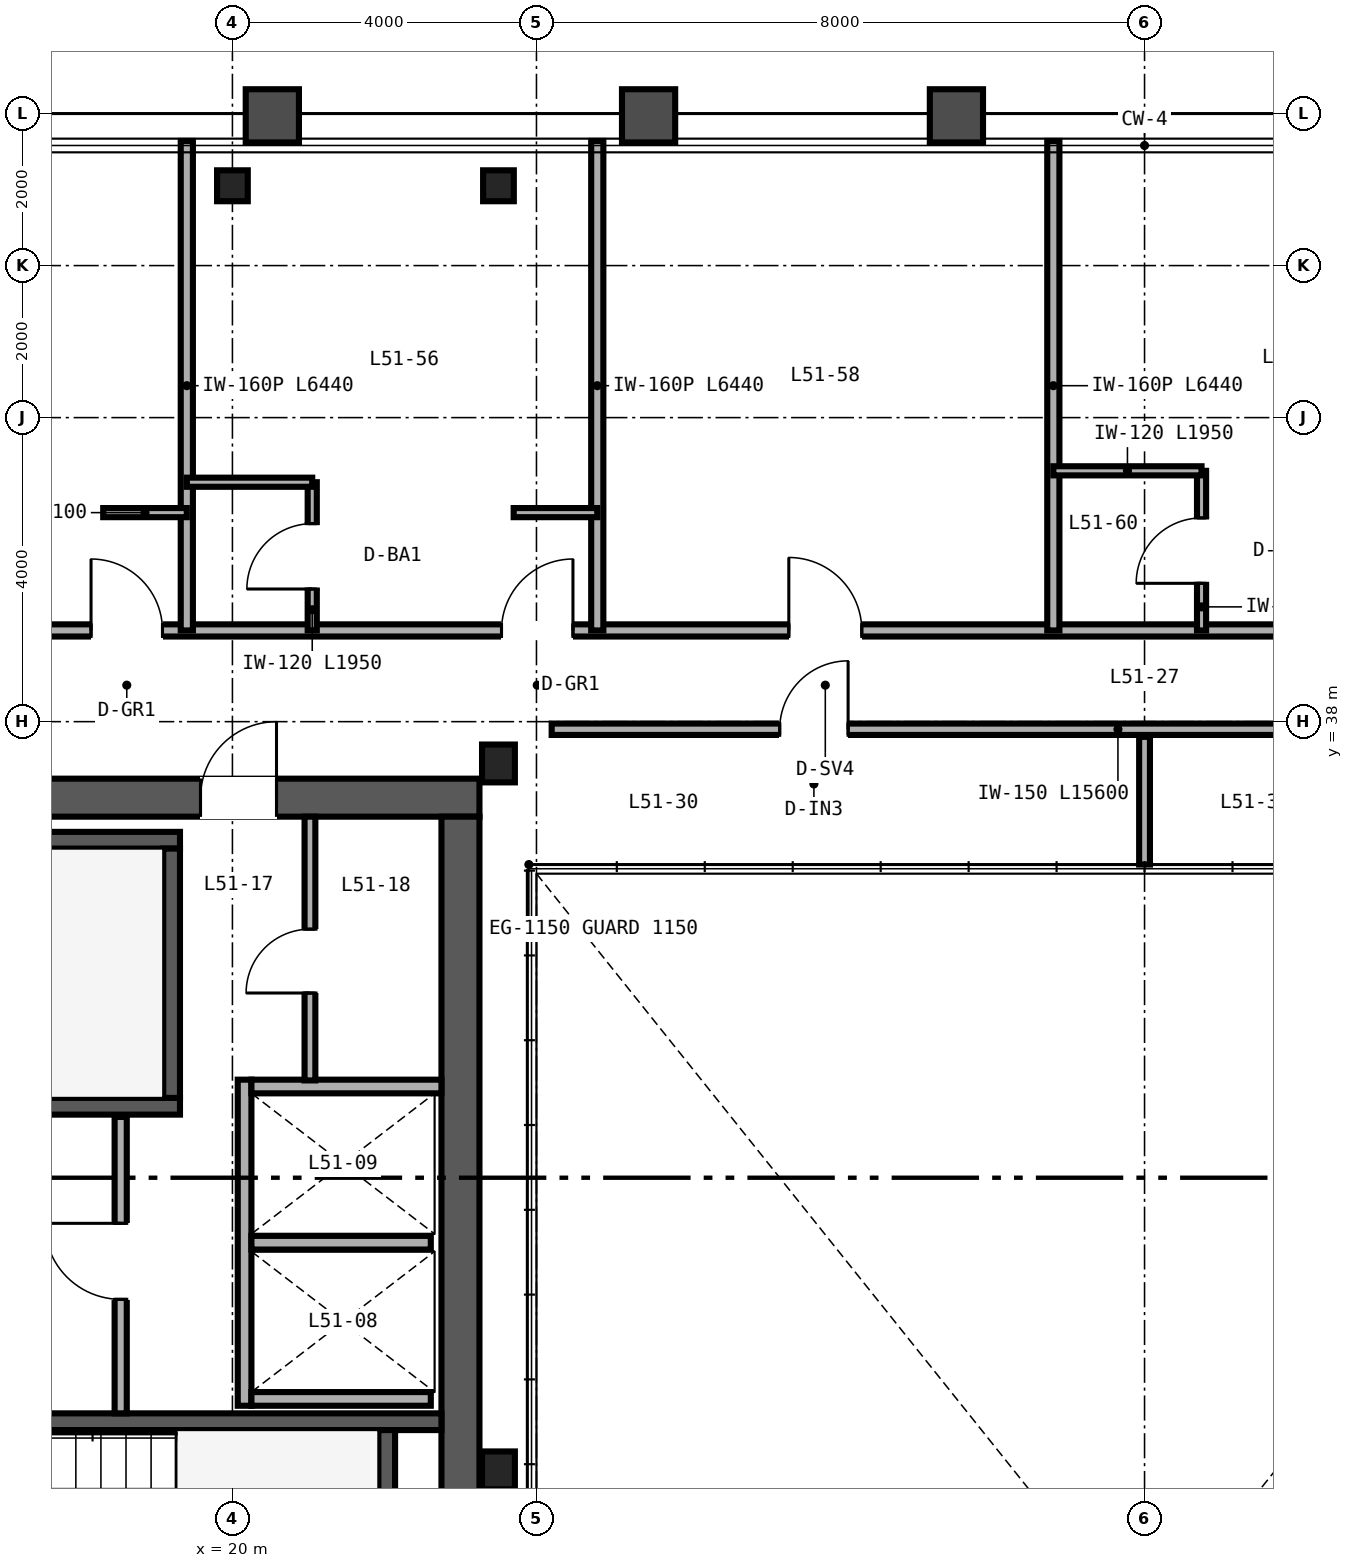
"""IFC4 building model, lengths in metres.
Left out: names, types, materials, properties, quantities, classifications, styles, units other than length and angle.
Written with IfcOpenShell. Run it as: python <this file> out.ifc"""

import sys

from ifc_helpers import new_model, si_unit, direction, frame, frame_2d, origin, origin_2d, place, context, subcontext, project, spatial, rectangle, i_section, extrude, source, transform, mapped, element, fill, save


model = new_model("IFC4")
c1 = context("Model", 3, precision=1e-05, world=origin(), true_north=direction((0.0, 1.0)))
c2 = subcontext(c1, "Body", "Model", "MODEL_VIEW")
j1 = project(units=[si_unit("LENGTHUNIT", "METRE"), si_unit("PLANEANGLEUNIT", "RADIAN")], contexts=[c1])
p1 = place(None, origin())
s1 = spatial("IfcSite", under=j1, at=p1, CompositionType="ELEMENT")
p2 = place(p1, origin())
s2 = spatial("IfcBuilding", under=s1, at=p2, CompositionType="ELEMENT")
p3 = place(p2, frame((0.0, 0.0, 202.8)))
s3 = spatial("IfcBuildingStorey", under=s2, at=p3, CompositionType="ELEMENT", Elevation=202.8)
p4 = place(p3, frame((10.75, 37.0, 0.0), z_axis=(0.0, 0.0, 1.0), x_axis=(1.0, 0.0, 0.0)))
e1 = element("IfcWall", 1, at=p4, inside=s3, PredefinedType="SHEAR", context=c2, shape_type="SweptSolid", body=[
    extrude(rectangle(XDim=12.5, YDim=0.5, at=frame_2d((6.25, 0.0))), origin(), (0.0, 0.0, 1.0), 3.37),
])
p5 = place(p4, frame((8.83, 0.0, 0.0)))
e2 = element("IfcOpeningElement", 2, at=p5, cuts=e1, PredefinedType="OPENING", context=c2, shape_type="SweptSolid", body=[
    extrude(rectangle(XDim=1.0, YDim=2.15, at=frame_2d((0.5, 1.075))), frame((0.0, 0.26, 0.0), z_axis=(0.0, -1.0, 0.0), x_axis=(1.0, 0.0, 0.0)), (0.0, 0.0, 1.0), 0.52),
])
p6 = place(p3, frame((23.0, 15.25, 0.0), z_axis=(0.0, 0.0, 1.0), x_axis=(0.0, 1.0, 0.0)))
e3 = element("IfcWall", 3, at=p6, inside=s3, PredefinedType="SHEAR", context=c2, shape_type="SweptSolid", body=[
    extrude(rectangle(XDim=21.5, YDim=0.5, at=frame_2d((10.75, 0.0))), origin(), (0.0, 0.0, 1.0), 3.37),
])
p7 = place(p3, frame((11.25, 32.94, 0.0), z_axis=(0.0, 0.0, 1.0), x_axis=(1.0, 0.0, 0.0)))
e4 = element("IfcWall", 4, at=p7, inside=s3, PredefinedType="SHEAR", context=c2, shape_type="SweptSolid", body=[
    extrude(rectangle(XDim=8.06, YDim=0.22, at=frame_2d((4.03, 0.0))), origin(), (0.0, 0.0, 1.0), 3.4),
])
p8 = place(p7, frame((0.67, 0.0, 0.0)))
e5 = element("IfcOpeningElement", 5, at=p8, cuts=e4, PredefinedType="OPENING", context=c2, shape_type="SweptSolid", body=[
    extrude(rectangle(XDim=1.05, YDim=2.15, at=frame_2d((0.525, 1.075))), frame((0.0, 0.12, 0.0), z_axis=(0.0, -1.0, 0.0), x_axis=(1.0, 0.0, 0.0)), (0.0, 0.0, 1.0), 0.24),
])
p9 = place(p3, frame((11.25, 36.44, 0.0), z_axis=(0.0, 0.0, 1.0), x_axis=(1.0, 0.0, 0.0)))
e6 = element("IfcWall", 6, at=p9, inside=s3, PredefinedType="SHEAR", context=c2, shape_type="SweptSolid", body=[
    extrude(rectangle(XDim=8.06, YDim=0.22, at=frame_2d((4.03, 0.0))), origin(), (0.0, 0.0, 1.0), 3.4),
])
p10 = place(p3, frame((19.2, 33.05, 0.0), z_axis=(0.0, 0.0, 1.0), x_axis=(0.0, 1.0, 0.0)))
e7 = element("IfcWall", 7, at=p10, inside=s3, PredefinedType="SHEAR", context=c2, shape_type="SweptSolid", body=[
    extrude(rectangle(XDim=3.28, YDim=0.22, at=frame_2d((1.64, 0.0))), origin(), (0.0, 0.0, 1.0), 3.4),
])
p11 = place(p3, frame((14.18, 28.79, 0.0), z_axis=(0.0, 0.0, 1.0), x_axis=(1.0, 0.0, 0.0)))
e8 = element("IfcWall", 8, at=p11, inside=s3, PredefinedType="SHEAR", context=c2, shape_type="SweptSolid", body=[
    extrude(rectangle(XDim=8.57, YDim=0.22, at=frame_2d((4.285, 0.0))), origin(), (0.0, 0.0, 1.0), 3.4),
])
p12 = place(p3, frame((22.03, 25.4, 0.0), z_axis=(0.0, 0.0, 1.0), x_axis=(0.0, 1.0, 0.0)))
e9 = element("IfcWall", 9, at=p12, inside=s3, PredefinedType="SHEAR", context=c2, shape_type="SweptSolid", body=[
    extrude(rectangle(XDim=3.28, YDim=0.22, at=frame_2d((1.64, 0.0))), origin(), (0.0, 0.0, 1.0), 3.4),
])
m1 = source(origin(), c2, "Body", "SweptSolid", [
    extrude(i_section(OverallWidth=0.432, OverallDepth=0.498, WebThickness=0.056, FlangeThickness=0.089, FilletRadius=0.025, at=origin_2d()), origin(), (0.0, 0.0, 1.0), 3.37),
])
for number, where, z_axis, x_axis in (
    (10, (23.5, 28.15, 0.0), (0.0, 0.0, 1.0), (1.0, 0.0, 0.0)),
    (11, (23.5, 37.45, 0.0), (0.0, 0.0, 1.0), (1.0, 0.0, 0.0)),
):
    element("IfcColumn", number, at=place(p3, frame(where, z_axis=z_axis, x_axis=x_axis)), inside=s3, PredefinedType="COLUMN", context=c2, shape_type="MappedRepresentation", body=[
        mapped(m1, transform((0.0, 0.0, 0.0), scale=1.0)),
    ])
m2 = source(origin(), c2, "Body", "SweptSolid", [
    extrude(i_section(OverallWidth=0.404, OverallDepth=0.407, WebThickness=0.027, FlangeThickness=0.044, FilletRadius=0.025, at=origin_2d()), origin(), (0.0, 0.0, 1.0), 3.37),
])
for number, where, z_axis, x_axis in (
    (12, (20.0, 45.05, 0.0), (0.0, 0.0, 1.0), (1.0, 0.0, 0.0)),
    (13, (23.5, 45.05, 0.0), (0.0, 0.0, 1.0), (1.0, 0.0, 0.0)),
):
    element("IfcColumn", number, at=place(p3, frame(where, z_axis=z_axis, x_axis=x_axis)), inside=s3, PredefinedType="COLUMN", context=c2, shape_type="MappedRepresentation", body=[
        mapped(m2, transform((0.0, 0.0, 0.0), scale=1.0)),
    ])
p13 = place(p3, frame((20.16, 29.0, 0.0), z_axis=(0.0, 0.0, 1.0), x_axis=(0.0, 1.0, 0.0)))
e14 = element("IfcWall", 14, at=p13, inside=s3, PredefinedType="SOLIDWALL", context=c2, shape_type="SweptSolid", body=[
    extrude(rectangle(XDim=4.29, YDim=0.18, at=frame_2d((2.145, 0.0))), origin(), (0.0, 0.0, 1.0), 3.37),
])
p14 = place(p3, frame((20.25, 29.09, 0.0), z_axis=(0.0, 0.0, 1.0), x_axis=(1.0, 0.0, 0.0)))
e15 = element("IfcWall", 15, at=p14, inside=s3, PredefinedType="SOLIDWALL", context=c2, shape_type="SweptSolid", body=[
    extrude(rectangle(XDim=2.36, YDim=0.18, at=frame_2d((1.18, 0.0))), origin(), (0.0, 0.0, 1.0), 3.37),
])
p15 = place(p3, frame((20.25, 33.2, 0.0), z_axis=(0.0, 0.0, 1.0), x_axis=(1.0, 0.0, 0.0)))
e16 = element("IfcWall", 16, at=p15, inside=s3, PredefinedType="SOLIDWALL", context=c2, shape_type="SweptSolid", body=[
    extrude(rectangle(XDim=2.5, YDim=0.18, at=frame_2d((1.25, 0.0))), origin(), (0.0, 0.0, 1.0), 3.37),
])
p16 = place(p3, frame((20.25, 31.145, 0.0), z_axis=(0.0, 0.0, 1.0), x_axis=(1.0, 0.0, 0.0)))
e17 = element("IfcWall", 17, at=p16, inside=s3, PredefinedType="SOLIDWALL", context=c2, shape_type="SweptSolid", body=[
    extrude(rectangle(XDim=2.36, YDim=0.18, at=frame_2d((1.18, 0.0))), origin(), (0.0, 0.0, 1.0), 3.37),
])
p17 = place(p3, frame((18.53, 28.9, 0.0), z_axis=(0.0, 0.0, 1.0), x_axis=(0.0, 1.0, 0.0)))
e18 = element("IfcWall", 18, at=p17, inside=s3, PredefinedType="PARTITIONING", context=c2, shape_type="SweptSolid", body=[
    extrude(rectangle(XDim=3.9, YDim=0.16, at=frame_2d((1.95, 0.0))), origin(), (0.0, 0.0, 1.0), 3.37),
])
p18 = place(p17, frame((1.5, 0.0, 0.0)))
e19 = element("IfcOpeningElement", 19, at=p18, cuts=e18, PredefinedType="OPENING", context=c2, shape_type="SweptSolid", body=[
    extrude(rectangle(XDim=1.0, YDim=2.15, at=frame_2d((0.5, 1.075))), frame((0.0, 0.09, 0.0), z_axis=(0.0, -1.0, 0.0), x_axis=(1.0, 0.0, 0.0)), (0.0, 0.0, 1.0), 0.18),
])
p19 = place(p3, frame((21.02, 33.28, 0.0), z_axis=(0.0, 0.0, 1.0), x_axis=(0.0, 1.0, 0.0)))
e20 = element("IfcWall", 20, at=p19, inside=s3, PredefinedType="PARTITIONING", context=c2, shape_type="SweptSolid", body=[
    extrude(rectangle(XDim=3.47, YDim=0.142, at=frame_2d((1.735, 0.0))), origin(), (0.0, 0.0, 1.0), 3.37),
])
p20 = place(p19, frame((1.15, 0.0, 0.0)))
e21 = element("IfcOpeningElement", 21, at=p20, cuts=e20, PredefinedType="OPENING", context=c2, shape_type="SweptSolid", body=[
    extrude(rectangle(XDim=0.84, YDim=2.1, at=frame_2d((0.42, 1.05))), frame((0.0, 0.081, 0.0), z_axis=(0.0, -1.0, 0.0), x_axis=(1.0, 0.0, 0.0)), (0.0, 0.0, 1.0), 0.162),
])
p21 = place(p3, frame((24.2, 37.9, 0.0), z_axis=(0.0, 0.0, 1.0), x_axis=(1.0, 0.0, 0.0)))
e22 = element("IfcWall", 22, at=p21, inside=s3, PredefinedType="PARTITIONING", context=c2, shape_type="SweptSolid", body=[
    extrude(rectangle(XDim=15.6, YDim=0.15, at=frame_2d((7.8, 0.0))), origin(), (0.0, 0.0, 1.0), 3.37),
])
p22 = place(p21, frame((3.0, 0.0, 0.0)))
e23 = element("IfcOpeningElement", 23, at=p22, cuts=e22, PredefinedType="OPENING", context=c2, shape_type="SweptSolid", body=[
    extrude(rectangle(XDim=0.9, YDim=2.15, at=frame_2d((0.45, 1.075))), frame((0.0, 0.085, 0.0), z_axis=(0.0, -1.0, 0.0), x_axis=(1.0, 0.0, 0.0)), (0.0, 0.0, 1.0), 0.17),
])
p23 = place(p21, frame((11.0, 0.0, 0.0)))
e24 = element("IfcOpeningElement", 24, at=p23, cuts=e22, PredefinedType="OPENING", context=c2, shape_type="SweptSolid", body=[
    extrude(rectangle(XDim=0.9, YDim=2.15, at=frame_2d((0.45, 1.075))), frame((0.0, 0.085, 0.0), z_axis=(0.0, -1.0, 0.0), x_axis=(1.0, 0.0, 0.0)), (0.0, 0.0, 1.0), 0.17),
])
p24 = place(p3, frame((32.0, 36.12, 0.0), z_axis=(0.0, 0.0, 1.0), x_axis=(0.0, 1.0, 0.0)))
e25 = element("IfcWall", 25, at=p24, inside=s3, PredefinedType="PARTITIONING", context=c2, shape_type="SweptSolid", body=[
    extrude(rectangle(XDim=1.68, YDim=0.142, at=frame_2d((0.84, 0.0))), origin(), (0.0, 0.0, 1.0), 3.37),
])
p25 = place(p3, frame((14.0, 39.2, 0.0), z_axis=(0.0, 0.0, 1.0), x_axis=(1.0, 0.0, 0.0)))
e26 = element("IfcWall", 26, at=p25, inside=s3, PredefinedType="PARTITIONING", context=c2, shape_type="SweptSolid", body=[
    extrude(rectangle(XDim=36.0, YDim=0.16, at=frame_2d((18.0, 0.0))), origin(), (0.0, 0.0, 1.0), 2.913),
])
p26 = place(p25, frame((4.14, 0.0, 0.0)))
e27 = element("IfcOpeningElement", 27, at=p26, cuts=e26, PredefinedType="OPENING", context=c2, shape_type="SweptSolid", body=[
    extrude(rectangle(XDim=0.94, YDim=2.15, at=frame_2d((0.47, 1.075))), frame((0.0, 0.09, 0.0), z_axis=(0.0, -1.0, 0.0), x_axis=(1.0, 0.0, 0.0)), (0.0, 0.0, 1.0), 0.18),
])
p27 = place(p25, frame((9.54, 0.0, 0.0)))
e28 = element("IfcOpeningElement", 28, at=p27, cuts=e26, PredefinedType="OPENING", context=c2, shape_type="SweptSolid", body=[
    extrude(rectangle(XDim=0.94, YDim=2.15, at=frame_2d((0.47, 1.075))), frame((0.0, 0.09, 0.0), z_axis=(0.0, -1.0, 0.0), x_axis=(1.0, 0.0, 0.0)), (0.0, 0.0, 1.0), 0.18),
])
p28 = place(p25, frame((13.32, 0.0, 0.0)))
e29 = element("IfcOpeningElement", 29, at=p28, cuts=e26, PredefinedType="OPENING", context=c2, shape_type="SweptSolid", body=[
    extrude(rectangle(XDim=0.96, YDim=2.15, at=frame_2d((0.48, 1.075))), frame((0.0, 0.09, 0.0), z_axis=(0.0, -1.0, 0.0), x_axis=(1.0, 0.0, 0.0)), (0.0, 0.0, 1.0), 0.18),
])
p29 = place(p25, frame((21.54, 0.0, 0.0)))
e30 = element("IfcOpeningElement", 30, at=p29, cuts=e26, PredefinedType="OPENING", context=c2, shape_type="SweptSolid", body=[
    extrude(rectangle(XDim=0.94, YDim=2.15, at=frame_2d((0.47, 1.075))), frame((0.0, 0.09, 0.0), z_axis=(0.0, -1.0, 0.0), x_axis=(1.0, 0.0, 0.0)), (0.0, 0.0, 1.0), 0.18),
])
p30 = place(p25, frame((28.14, 0.0, 0.0)))
e31 = element("IfcOpeningElement", 31, at=p30, cuts=e26, PredefinedType="OPENING", context=c2, shape_type="SweptSolid", body=[
    extrude(rectangle(XDim=0.94, YDim=2.15, at=frame_2d((0.47, 1.075))), frame((0.0, 0.09, 0.0), z_axis=(0.0, -1.0, 0.0), x_axis=(1.0, 0.0, 0.0)), (0.0, 0.0, 1.0), 0.18),
])
p31 = place(p25, frame((34.74, 0.0, 0.0)))
e32 = element("IfcOpeningElement", 32, at=p31, cuts=e26, PredefinedType="OPENING", context=c2, shape_type="SweptSolid", body=[
    extrude(rectangle(XDim=0.94, YDim=2.15, at=frame_2d((0.47, 1.075))), frame((0.0, 0.09, 0.0), z_axis=(0.0, -1.0, 0.0), x_axis=(1.0, 0.0, 0.0)), (0.0, 0.0, 1.0), 0.18),
])
p32 = place(p3, frame((19.4, 39.2, 0.0), z_axis=(0.0, 0.0, 1.0), x_axis=(0.0, 1.0, 0.0)))
e33 = element("IfcWall", 33, at=p32, inside=s3, PredefinedType="PARTITIONING", context=c2, shape_type="SweptSolid", body=[
    extrude(rectangle(XDim=6.44, YDim=0.16, at=frame_2d((3.22, 0.0))), origin(), (0.0, 0.0, 1.0), 2.677),
])
p33 = place(p3, frame((18.3, 40.75, 0.0), z_axis=(0.0, 0.0, 1.0), x_axis=(1.0, 0.0, 0.0)))
e34 = element("IfcWall", 34, at=p33, inside=s3, PredefinedType="PARTITIONING", context=c2, shape_type="SweptSolid", body=[
    extrude(rectangle(XDim=1.1, YDim=0.12, at=frame_2d((0.55, 0.0))), origin(), (0.0, 0.0, 1.0), 3.37),
])
p34 = place(p3, frame((24.8, 39.2, 0.0), z_axis=(0.0, 0.0, 1.0), x_axis=(0.0, 1.0, 0.0)))
e35 = element("IfcWall", 35, at=p34, inside=s3, PredefinedType="PARTITIONING", context=c2, shape_type="SweptSolid", body=[
    extrude(rectangle(XDim=6.44, YDim=0.16, at=frame_2d((3.22, 0.0))), origin(), (0.0, 0.0, 1.0), 2.443),
])
p35 = place(p3, frame((21.05, 39.2, 0.0), z_axis=(0.0, 0.0, 1.0), x_axis=(0.0, 1.0, 0.0)))
e36 = element("IfcWall", 36, at=p35, inside=s3, PredefinedType="PARTITIONING", context=c2, shape_type="SweptSolid", body=[
    extrude(rectangle(XDim=1.95, YDim=0.12, at=frame_2d((0.975, 0.0))), origin(), (0.0, 0.0, 1.0), 3.37),
])
p36 = place(p35, frame((0.545, 0.0, 0.0)))
e37 = element("IfcOpeningElement", 37, at=p36, cuts=e36, PredefinedType="OPENING", context=c2, shape_type="SweptSolid", body=[
    extrude(rectangle(XDim=0.86, YDim=2.1, at=frame_2d((0.43, 1.05))), frame((0.0, 0.07, 0.0), z_axis=(0.0, -1.0, 0.0), x_axis=(1.0, 0.0, 0.0)), (0.0, 0.0, 1.0), 0.14),
])
p37 = place(p3, frame((19.4, 41.15, 0.0), z_axis=(0.0, 0.0, 1.0), x_axis=(1.0, 0.0, 0.0)))
e38 = element("IfcWall", 38, at=p37, inside=s3, PredefinedType="PARTITIONING", context=c2, shape_type="SweptSolid", body=[
    extrude(rectangle(XDim=1.65, YDim=0.12, at=frame_2d((0.825, 0.0))), origin(), (0.0, 0.0, 1.0), 3.37),
])
p38 = place(p3, frame((23.7, 40.75, 0.0), z_axis=(0.0, 0.0, 1.0), x_axis=(1.0, 0.0, 0.0)))
e39 = element("IfcWall", 39, at=p38, inside=s3, PredefinedType="PARTITIONING", context=c2, shape_type="SweptSolid", body=[
    extrude(rectangle(XDim=1.1, YDim=0.12, at=frame_2d((0.55, 0.0))), origin(), (0.0, 0.0, 1.0), 2.913),
])
p39 = place(p3, frame((30.8, 39.2, 0.0), z_axis=(0.0, 0.0, 1.0), x_axis=(0.0, 1.0, 0.0)))
e40 = element("IfcWall", 40, at=p39, inside=s3, PredefinedType="PARTITIONING", context=c2, shape_type="SweptSolid", body=[
    extrude(rectangle(XDim=6.44, YDim=0.16, at=frame_2d((3.22, 0.0))), origin(), (0.0, 0.0, 1.0), 2.443),
])
p40 = place(p3, frame((32.75, 39.2, 0.0), z_axis=(0.0, 0.0, 1.0), x_axis=(0.0, 1.0, 0.0)))
e41 = element("IfcWall", 41, at=p40, inside=s3, PredefinedType="PARTITIONING", context=c2, shape_type="SweptSolid", body=[
    extrude(rectangle(XDim=2.1, YDim=0.12, at=frame_2d((1.05, 0.0))), origin(), (0.0, 0.0, 1.0), 3.37),
])
p41 = place(p40, frame((0.62, 0.0, 0.0)))
e42 = element("IfcOpeningElement", 42, at=p41, cuts=e41, PredefinedType="OPENING", context=c2, shape_type="SweptSolid", body=[
    extrude(rectangle(XDim=0.86, YDim=2.1, at=frame_2d((0.43, 1.05))), frame((0.0, 0.07, 0.0), z_axis=(0.0, -1.0, 0.0), x_axis=(1.0, 0.0, 0.0)), (0.0, 0.0, 1.0), 0.14),
])
p42 = place(p3, frame((30.8, 41.3, 0.0), z_axis=(0.0, 0.0, 1.0), x_axis=(1.0, 0.0, 0.0)))
e43 = element("IfcWall", 43, at=p42, inside=s3, PredefinedType="PARTITIONING", context=c2, shape_type="SweptSolid", body=[
    extrude(rectangle(XDim=1.95, YDim=0.12, at=frame_2d((0.975, 0.0))), origin(), (0.0, 0.0, 1.0), 3.37),
])
m3 = source(origin(), c2, "Body", "SweptSolid", [
    extrude(rectangle(XDim=1.0, YDim=2.15, at=frame_2d((0.5, 1.075))), frame((0.0, 0.025, 0.0), z_axis=(0.0, -1.0, 0.0), x_axis=(1.0, 0.0, 0.0)), (0.0, 0.0, 1.0), 0.05),
])
p43 = place(p18, origin())
e44 = element("IfcDoor", 44, at=p43, inside=s3, OperationType="SINGLE_SWING_RIGHT", PredefinedType="DOOR", context=c2, shape_type="MappedRepresentation", body=[
    mapped(m3, transform((0.0, 0.0, 0.0), scale=1.0)),
])
fill(e19, e44)
m4 = source(origin(), c2, "Body", "SweptSolid", [
    extrude(rectangle(XDim=0.84, YDim=2.1, at=frame_2d((0.42, 1.05))), frame((0.0, 0.025, 0.0), z_axis=(0.0, -1.0, 0.0), x_axis=(1.0, 0.0, 0.0)), (0.0, 0.0, 1.0), 0.05),
])
p44 = place(p20, origin())
e45 = element("IfcDoor", 45, at=p44, inside=s3, OperationType="SINGLE_SWING_LEFT", PredefinedType="DOOR", context=c2, shape_type="MappedRepresentation", body=[
    mapped(m4, transform((0.0, 0.0, 0.0), scale=1.0)),
])
fill(e21, e45)
p45 = place(p5, origin())
e46 = element("IfcDoor", 46, at=p45, inside=s3, OperationType="SINGLE_SWING_RIGHT", PredefinedType="DOOR", context=c2, shape_type="MappedRepresentation", body=[
    mapped(m3, transform((0.0, 0.0, 0.0), scale=1.0)),
])
fill(e2, e46)
m5 = source(origin(), c2, "Body", "SweptSolid", [
    extrude(rectangle(XDim=0.9, YDim=2.15, at=frame_2d((0.45, 1.075))), frame((0.0, 0.025, 0.0), z_axis=(0.0, -1.0, 0.0), x_axis=(1.0, 0.0, 0.0)), (0.0, 0.0, 1.0), 0.05),
])
p46 = place(p22, origin())
e47 = element("IfcDoor", 47, at=p46, inside=s3, OperationType="SINGLE_SWING_RIGHT", PredefinedType="DOOR", context=c2, shape_type="MappedRepresentation", body=[
    mapped(m5, transform((0.0, 0.0, 0.0), scale=1.0)),
])
fill(e23, e47)
m6 = source(origin(), c2, "Body", "SweptSolid", [
    extrude(rectangle(XDim=0.86, YDim=2.1, at=frame_2d((0.43, 1.05))), frame((0.0, 0.025, 0.0), z_axis=(0.0, -1.0, 0.0), x_axis=(1.0, 0.0, 0.0)), (0.0, 0.0, 1.0), 0.05),
])
p47 = place(p36, origin())
e48 = element("IfcDoor", 48, at=p47, inside=s3, OperationType="SINGLE_SWING_LEFT", PredefinedType="DOOR", context=c2, shape_type="MappedRepresentation", body=[
    mapped(m6, transform((0.0, 0.0, 0.0), scale=1.0)),
])
fill(e37, e48)
p48 = place(p41, origin())
e49 = element("IfcDoor", 49, at=p48, inside=s3, OperationType="SINGLE_SWING_LEFT", PredefinedType="DOOR", context=c2, shape_type="MappedRepresentation", body=[
    mapped(m6, transform((0.0, 0.0, 0.0), scale=1.0)),
])
fill(e42, e49)
m7 = source(origin(), c2, "Body", "SweptSolid", [
    extrude(rectangle(XDim=0.94, YDim=2.15, at=frame_2d((0.47, 1.075))), frame((0.0, 0.025, 0.0), z_axis=(0.0, -1.0, 0.0), x_axis=(1.0, 0.0, 0.0)), (0.0, 0.0, 1.0), 0.05),
])
p49 = place(p26, origin())
e50 = element("IfcDoor", 50, at=p49, inside=s3, OperationType="SINGLE_SWING_LEFT", PredefinedType="DOOR", context=c2, shape_type="MappedRepresentation", body=[
    mapped(m7, transform((0.0, 0.0, 0.0), scale=1.0)),
])
fill(e27, e50)
p50 = place(p27, origin())
e51 = element("IfcDoor", 51, at=p50, inside=s3, OperationType="SINGLE_SWING_RIGHT", PredefinedType="DOOR", context=c2, shape_type="MappedRepresentation", body=[
    mapped(m7, transform((0.0, 0.0, 0.0), scale=1.0)),
])
fill(e28, e51)
m8 = source(origin(), c2, "Body", "SweptSolid", [
    extrude(rectangle(XDim=0.96, YDim=2.15, at=frame_2d((0.48, 1.075))), frame((0.0, 0.025, 0.0), z_axis=(0.0, -1.0, 0.0), x_axis=(1.0, 0.0, 0.0)), (0.0, 0.0, 1.0), 0.05),
])
p51 = place(p28, origin())
e52 = element("IfcDoor", 52, at=p51, inside=s3, OperationType="SINGLE_SWING_LEFT", PredefinedType="DOOR", context=c2, shape_type="MappedRepresentation", body=[
    mapped(m8, transform((0.0, 0.0, 0.0), scale=1.0)),
])
fill(e29, e52)
save(model, sys.argv[1])
